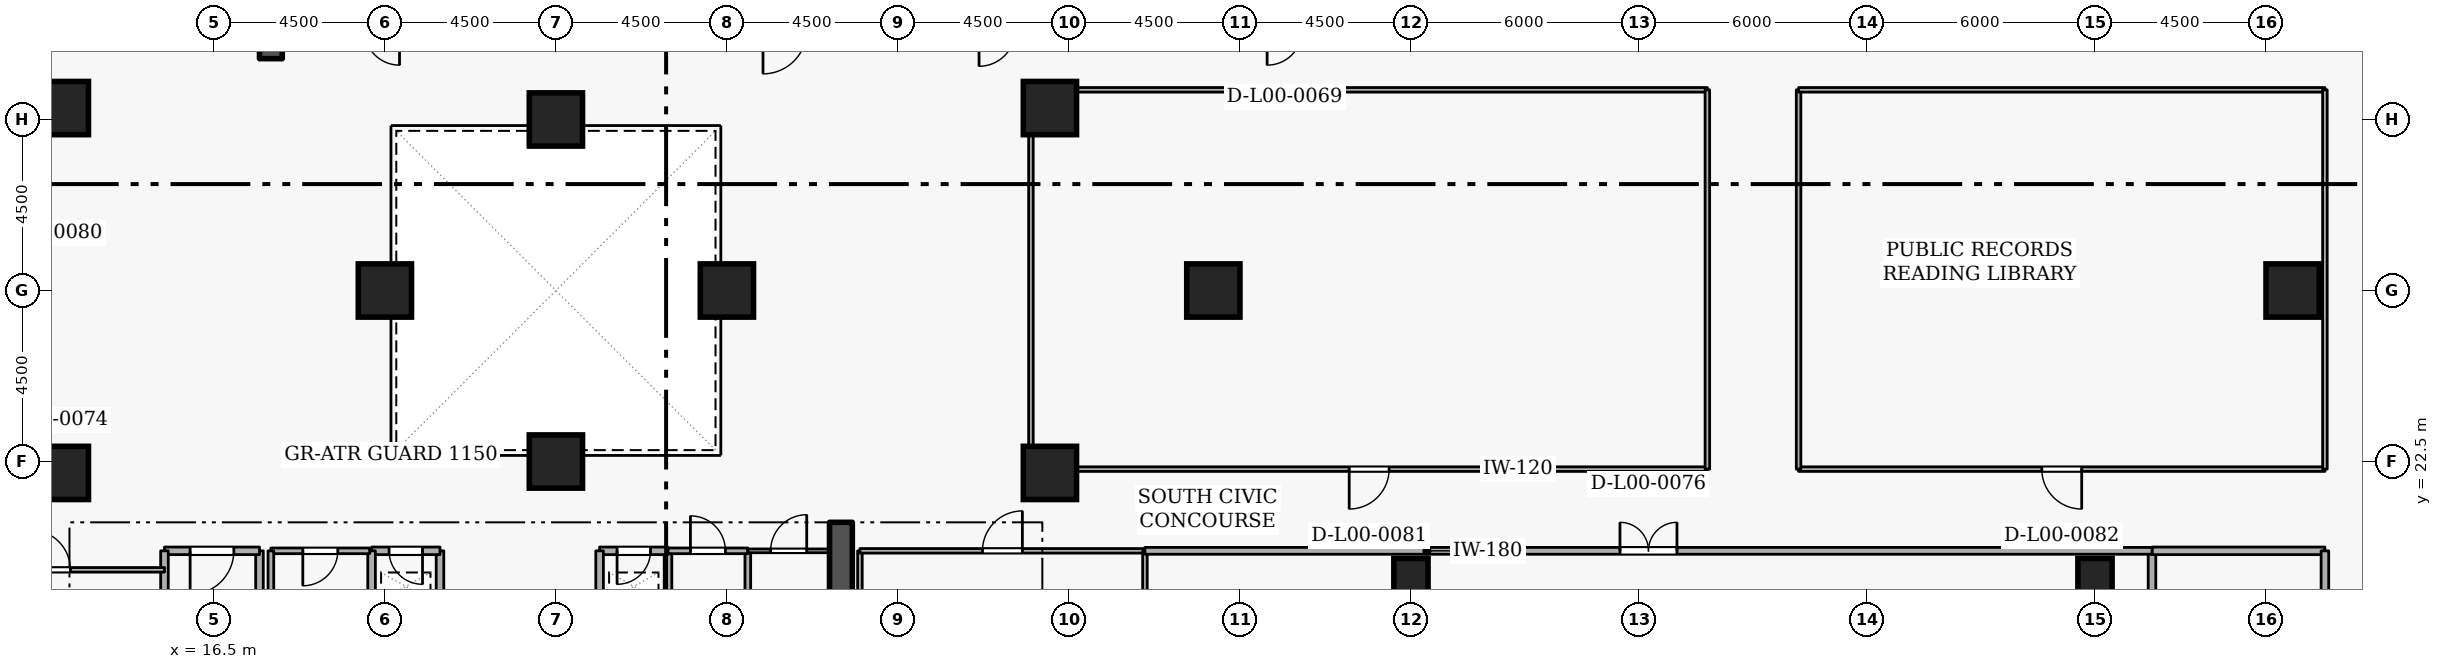
"""IFC4 building model, lengths in metres.
Left out: names, types, materials, properties, quantities, classifications, styles, units other than length and angle.
Written with IfcOpenShell. Run it as: python <this file> out.ifc"""

import sys

from ifc_helpers import new_model, si_unit, direction, frame, frame_2d, origin, origin_2d, place, context, subcontext, project, spatial, rectangle, extrude, element, fill, save


model = new_model("IFC4")
c1 = context("Model", 3, precision=1e-05, world=origin(), true_north=direction((0.0, 1.0)))
c2 = subcontext(c1, "Body", "Model", "MODEL_VIEW")
j1 = project(units=[si_unit("LENGTHUNIT", "METRE"), si_unit("PLANEANGLEUNIT", "RADIAN")], contexts=[c1])
p1 = place(None, origin())
s1 = spatial("IfcSite", under=j1, at=p1, CompositionType="ELEMENT")
p2 = place(p1, origin())
s2 = spatial("IfcBuilding", under=s1, at=p2, CompositionType="ELEMENT")
p3 = place(p2, origin())
s3 = spatial("IfcBuildingStorey", under=s2, at=p3, CompositionType="ELEMENT", Elevation=0.0)
for number, where, z_axis, x_axis in (
    (1, (33.0, 15.2, 0.0), (0.0, 0.0, 1.0), (0.0, 1.0, 0.0)),
    (2, (18.0, 33.1, 0.0), (0.0, 0.0, 1.0), (0.0, 1.0, 0.0)),
):
    element("IfcWall", number, at=place(p3, frame(where, z_axis=z_axis, x_axis=x_axis)), inside=s3, PredefinedType="SHEAR", context=c2, shape_type="SweptSolid", body=[
        extrude(rectangle(XDim=5.7, YDim=0.6, at=frame_2d((2.85, 0.0))), origin(), (0.0, 0.0, 1.0), 4.8),
    ])
for number, where, z_axis, x_axis in (
    (3, (42.8, 27.0, 0.0), (0.0, 0.0, 1.0), (1.0, 0.0, 0.0)),
    (4, (12.5, 22.2, 0.0), (0.0, 0.0, 1.0), (1.0, 0.0, 0.0)),
    (5, (38.5, 22.2, 0.0), (0.0, 0.0, 1.0), (1.0, 0.0, 0.0)),
    (6, (12.5, 31.8, 0.0), (0.0, 0.0, 1.0), (1.0, 0.0, 0.0)),
    (7, (38.5, 31.8, 0.0), (0.0, 0.0, 1.0), (1.0, 0.0, 0.0)),
    (8, (25.5, 22.5, 0.0), (0.0, 0.0, 1.0), (1.0, 0.0, 0.0)),
    (9, (25.5, 31.5, 0.0), (0.0, 0.0, 1.0), (1.0, 0.0, 0.0)),
    (10, (21.0, 27.0, 0.0), (0.0, 0.0, 1.0), (1.0, 0.0, 0.0)),
    (11, (30.0, 27.0, 0.0), (0.0, 0.0, 1.0), (1.0, 0.0, 0.0)),
    (12, (71.2, 27.0, 0.0), (0.0, 0.0, 1.0), (1.0, 0.0, 0.0)),
):
    element("IfcColumn", number, at=place(p3, frame(where, z_axis=z_axis, x_axis=x_axis)), inside=s3, PredefinedType="COLUMN", context=c2, shape_type="SweptSolid", body=[
        extrude(rectangle(XDim=1.4, YDim=1.4, at=origin_2d()), origin(), (0.0, 0.0, 1.0), 4.8),
    ])
for number, where, z_axis, x_axis in (
    (13, (48.0, 19.5, 0.0), (0.0, 0.0, 1.0), (1.0, 0.0, 0.0)),
    (14, (66.0, 19.5, 0.0), (0.0, 0.0, 1.0), (1.0, 0.0, 0.0)),
):
    element("IfcColumn", number, at=place(p3, frame(where, z_axis=z_axis, x_axis=x_axis)), inside=s3, PredefinedType="COLUMN", context=c2, shape_type="SweptSolid", body=[
        extrude(rectangle(XDim=0.9, YDim=0.9, at=origin_2d()), origin(), (0.0, 0.0, 1.0), 4.8),
    ])
p4 = place(p3, frame((17.7, 18.4, 0.0), z_axis=(0.0, 0.0, 1.0), x_axis=(0.0, 1.0, 0.0)))
e15 = element("IfcWall", 15, at=p4, inside=s3, PredefinedType="STANDARD", context=c2, shape_type="SweptSolid", body=[
    extrude(rectangle(XDim=1.75, YDim=0.2, at=frame_2d((0.875, 0.0))), origin(), (0.0, 0.0, 1.0), 3.665),
])
p5 = place(p3, frame((17.7, 20.15, 0.0), z_axis=(0.0, 0.0, 1.0), x_axis=(-1.0, 0.0, 0.0)))
e16 = element("IfcWall", 16, at=p5, inside=s3, PredefinedType="STANDARD", context=c2, shape_type="SweptSolid", body=[
    extrude(rectangle(XDim=2.5, YDim=0.2, at=frame_2d((1.25, 0.0))), origin(), (0.0, 0.0, 1.0), 4.46),
])
p6 = place(p5, frame((0.675, 0.0, 0.0)))
e17 = element("IfcOpeningElement", 17, at=p6, cuts=e16, PredefinedType="OPENING", context=c2, shape_type="SweptSolid", body=[
    extrude(rectangle(XDim=1.15, YDim=2.1, at=frame_2d((0.575, 1.05))), frame((0.0, 0.11, 0.0), z_axis=(0.0, -1.0, 0.0), x_axis=(1.0, 0.0, 0.0)), (0.0, 0.0, 1.0), 0.22),
])
p7 = place(p3, frame((15.2, 20.15, 0.0), z_axis=(0.0, 0.0, 1.0), x_axis=(0.0, -1.0, 0.0)))
e18 = element("IfcWall", 18, at=p7, inside=s3, PredefinedType="STANDARD", context=c2, shape_type="SweptSolid", body=[
    extrude(rectangle(XDim=5.15, YDim=0.2, at=frame_2d((2.575, 0.0))), origin(), (0.0, 0.0, 1.0), 4.46),
])
p8 = place(p3, frame((28.45, 18.65, 0.0), z_axis=(0.0, 0.0, 1.0), x_axis=(0.0, 1.0, 0.0)))
e19 = element("IfcWall", 19, at=p8, inside=s3, PredefinedType="STANDARD", context=c2, shape_type="SweptSolid", body=[
    extrude(rectangle(XDim=1.5, YDim=0.2, at=frame_2d((0.75, 0.0))), origin(), (0.0, 0.0, 1.0), 4.46),
])
p9 = place(p3, frame((28.45, 20.15, 0.0), z_axis=(0.0, 0.0, 1.0), x_axis=(-1.0, 0.0, 0.0)))
e20 = element("IfcWall", 20, at=p9, inside=s3, PredefinedType="STANDARD", context=c2, shape_type="SweptSolid", body=[
    extrude(rectangle(XDim=1.8, YDim=0.2, at=frame_2d((0.9, 0.0))), origin(), (0.0, 0.0, 1.0), 4.46),
])
p10 = place(p9, frame((0.46, 0.0, 0.0)))
e21 = element("IfcOpeningElement", 21, at=p10, cuts=e20, PredefinedType="OPENING", context=c2, shape_type="SweptSolid", body=[
    extrude(rectangle(XDim=0.88, YDim=2.04, at=frame_2d((0.44, 1.02))), frame((0.0, 0.11, 0.0), z_axis=(0.0, -1.0, 0.0), x_axis=(1.0, 0.0, 0.0)), (0.0, 0.0, 1.0), 0.22),
])
for number, where, z_axis, x_axis in (
    (22, (26.65, 20.15, 0.0), (0.0, 0.0, 1.0), (0.0, -1.0, 0.0)),
    (23, (22.45, 18.65, 0.0), (0.0, 0.0, 1.0), (0.0, 1.0, 0.0)),
):
    element("IfcWall", number, at=place(p3, frame(where, z_axis=z_axis, x_axis=x_axis)), inside=s3, PredefinedType="STANDARD", context=c2, shape_type="SweptSolid", body=[
        extrude(rectangle(XDim=1.5, YDim=0.2, at=frame_2d((0.75, 0.0))), origin(), (0.0, 0.0, 1.0), 4.46),
    ])
p11 = place(p3, frame((22.45, 20.15, 0.0), z_axis=(0.0, 0.0, 1.0), x_axis=(-1.0, 0.0, 0.0)))
e24 = element("IfcWall", 24, at=p11, inside=s3, PredefinedType="STANDARD", context=c2, shape_type="SweptSolid", body=[
    extrude(rectangle(XDim=1.8, YDim=0.2, at=frame_2d((0.9, 0.0))), origin(), (0.0, 0.0, 1.0), 4.46),
])
p12 = place(p11, frame((0.46, 0.0, 0.0)))
e25 = element("IfcOpeningElement", 25, at=p12, cuts=e24, PredefinedType="OPENING", context=c2, shape_type="SweptSolid", body=[
    extrude(rectangle(XDim=0.88, YDim=2.04, at=frame_2d((0.44, 1.02))), frame((0.0, 0.11, 0.0), z_axis=(0.0, -1.0, 0.0), x_axis=(1.0, 0.0, 0.0)), (0.0, 0.0, 1.0), 0.22),
])
p13 = place(p3, frame((20.65, 20.15, 0.0), z_axis=(0.0, 0.0, 1.0), x_axis=(0.0, -1.0, 0.0)))
e26 = element("IfcWall", 26, at=p13, inside=s3, PredefinedType="STANDARD", context=c2, shape_type="SweptSolid", body=[
    extrude(rectangle(XDim=1.5, YDim=0.2, at=frame_2d((0.75, 0.0))), origin(), (0.0, 0.0, 1.0), 4.46),
])
p14 = place(p3, frame((67.5, 4.82, 0.0), z_axis=(0.0, 0.0, 1.0), x_axis=(0.0, 1.0, 0.0)))
e27 = element("IfcWall", 27, at=p14, inside=s3, PredefinedType="STANDARD", context=c2, shape_type="SweptSolid", body=[
    extrude(rectangle(XDim=15.33, YDim=0.2, at=frame_2d((7.665, 0.0))), origin(), (0.0, 0.0, 1.0), 3.538),
])
p15 = place(p3, frame((67.5, 20.15, 0.0), z_axis=(0.0, 0.0, 1.0), x_axis=(1.0, 0.0, 0.0)))
e28 = element("IfcWall", 28, at=p15, inside=s3, PredefinedType="STANDARD", context=c2, shape_type="SweptSolid", body=[
    extrude(rectangle(XDim=4.55, YDim=0.2, at=frame_2d((2.275, 0.0))), origin(), (0.0, 0.0, 1.0), 4.46),
])
p16 = place(p3, frame((72.05, 20.15, 0.0), z_axis=(0.0, 0.0, 1.0), x_axis=(0.0, -1.0, 0.0)))
e29 = element("IfcWall", 29, at=p16, inside=s3, PredefinedType="STANDARD", context=c2, shape_type="SweptSolid", body=[
    extrude(rectangle(XDim=5.35, YDim=0.2, at=frame_2d((2.675, 0.0))), origin(), (0.0, 0.0, 1.0), 4.46),
])
p17 = place(p16, frame((2.1, 0.0, 0.0)))
e30 = element("IfcOpeningElement", 30, at=p17, cuts=e29, PredefinedType="OPENING", context=c2, shape_type="SweptSolid", body=[
    extrude(rectangle(XDim=1.15, YDim=2.1, at=frame_2d((0.575, 1.05))), frame((0.0, 0.11, 0.0), z_axis=(0.0, -1.0, 0.0), x_axis=(1.0, 0.0, 0.0)), (0.0, 0.0, 1.0), 0.22),
])
p18 = place(p3, frame((20.6, 20.15, 0.0), z_axis=(0.0, 0.0, 1.0), x_axis=(-1.0, 0.0, 0.0)))
e31 = element("IfcWall", 31, at=p18, inside=s3, PredefinedType="PARTITIONING", context=c2, shape_type="SweptSolid", body=[
    extrude(rectangle(XDim=2.6, YDim=0.15, at=frame_2d((1.3, 0.0))), origin(), (0.0, 0.0, 1.0), 4.46),
])
p19 = place(p18, frame((0.84, 0.0, 0.0)))
e32 = element("IfcOpeningElement", 32, at=p19, cuts=e31, PredefinedType="OPENING", context=c2, shape_type="SweptSolid", body=[
    extrude(rectangle(XDim=0.92, YDim=2.08, at=frame_2d((0.46, 1.04))), frame((0.0, 0.085, 0.0), z_axis=(0.0, -1.0, 0.0), x_axis=(1.0, 0.0, 0.0)), (0.0, 0.0, 1.0), 0.17),
])
p20 = place(p3, frame((18.0, 20.15, 0.0), z_axis=(0.0, 0.0, 1.0), x_axis=(0.0, -1.0, 0.0)))
e33 = element("IfcWall", 33, at=p20, inside=s3, PredefinedType="PARTITIONING", context=c2, shape_type="SweptSolid", body=[
    extrude(rectangle(XDim=1.5, YDim=0.15, at=frame_2d((0.75, 0.0))), origin(), (0.0, 0.0, 1.0), 3.665),
])
p21 = place(p3, frame((30.55, 20.15, 0.0), z_axis=(0.0, 0.0, 1.0), x_axis=(0.0, -1.0, 0.0)))
e34 = element("IfcWall", 34, at=p21, inside=s3, PredefinedType="PARTITIONING", context=c2, shape_type="SweptSolid", body=[
    extrude(rectangle(XDim=1.5, YDim=0.15, at=frame_2d((0.75, 0.0))), origin(), (0.0, 0.0, 1.0), 4.46),
])
p22 = place(p3, frame((28.45, 20.15, 0.0), z_axis=(0.0, 0.0, 1.0), x_axis=(1.0, 0.0, 0.0)))
e35 = element("IfcWall", 35, at=p22, inside=s3, PredefinedType="PARTITIONING", context=c2, shape_type="SweptSolid", body=[
    extrude(rectangle(XDim=2.1, YDim=0.15, at=frame_2d((1.05, 0.0))), origin(), (0.0, 0.0, 1.0), 4.46),
])
p23 = place(p22, frame((0.59, 0.0, 0.0)))
e36 = element("IfcOpeningElement", 36, at=p23, cuts=e35, PredefinedType="OPENING", context=c2, shape_type="SweptSolid", body=[
    extrude(rectangle(XDim=0.92, YDim=2.08, at=frame_2d((0.46, 1.04))), frame((0.0, 0.085, 0.0), z_axis=(0.0, -1.0, 0.0), x_axis=(1.0, 0.0, 0.0)), (0.0, 0.0, 1.0), 0.17),
])
p24 = place(p3, frame((30.55, 20.15, 0.0), z_axis=(0.0, 0.0, 1.0), x_axis=(1.0, 0.0, 0.0)))
e37 = element("IfcWall", 37, at=p24, inside=s3, PredefinedType="PARTITIONING", context=c2, shape_type="SweptSolid", body=[
    extrude(rectangle(XDim=2.15, YDim=0.1, at=frame_2d((1.075, 0.0))), origin(), (0.0, 0.0, 1.0), 4.46),
])
p25 = place(p24, frame((0.6, 0.0, 0.0)))
e38 = element("IfcOpeningElement", 38, at=p25, cuts=e37, PredefinedType="OPENING", context=c2, shape_type="SweptSolid", body=[
    extrude(rectangle(XDim=0.95, YDim=2.1, at=frame_2d((0.475, 1.05))), frame((0.0, 0.06, 0.0), z_axis=(0.0, -1.0, 0.0), x_axis=(1.0, 0.0, 0.0)), (0.0, 0.0, 1.0), 0.12),
])
p26 = place(p3, frame((9.2, 19.65, 0.0), z_axis=(0.0, 0.0, 1.0), x_axis=(1.0, 0.0, 0.0)))
e39 = element("IfcWall", 39, at=p26, inside=s3, PredefinedType="PARTITIONING", context=c2, shape_type="SweptSolid", body=[
    extrude(rectangle(XDim=6.0, YDim=0.12, at=frame_2d((3.0, 0.0))), origin(), (0.0, 0.0, 1.0), 4.46),
])
p27 = place(p26, frame((2.475, 0.0, 0.0)))
e40 = element("IfcOpeningElement", 40, at=p27, cuts=e39, PredefinedType="OPENING", context=c2, shape_type="SweptSolid", body=[
    extrude(rectangle(XDim=1.05, YDim=2.1, at=frame_2d((0.525, 1.05))), frame((0.0, 0.07, 0.0), z_axis=(0.0, -1.0, 0.0), x_axis=(1.0, 0.0, 0.0)), (0.0, 0.0, 1.0), 0.14),
])
p28 = place(p3, frame((33.5, 4.82, 0.0), z_axis=(0.0, 0.0, 1.0), x_axis=(0.0, 1.0, 0.0)))
e41 = element("IfcWall", 41, at=p28, inside=s3, PredefinedType="PARTITIONING", context=c2, shape_type="SweptSolid", body=[
    extrude(rectangle(XDim=15.33, YDim=0.12, at=frame_2d((7.665, 0.0))), origin(), (0.0, 0.0, 1.0), 4.46),
])
p29 = place(p3, frame((33.5, 20.15, 0.0), z_axis=(0.0, 0.0, 1.0), x_axis=(1.0, 0.0, 0.0)))
e42 = element("IfcWall", 42, at=p29, inside=s3, PredefinedType="PARTITIONING", context=c2, shape_type="SweptSolid", body=[
    extrude(rectangle(XDim=7.5, YDim=0.12, at=frame_2d((3.75, 0.0))), origin(), (0.0, 0.0, 1.0), 4.46),
])
p30 = place(p29, frame((3.225, 0.0, 0.0)))
e43 = element("IfcOpeningElement", 43, at=p30, cuts=e42, PredefinedType="OPENING", context=c2, shape_type="SweptSolid", body=[
    extrude(rectangle(XDim=1.05, YDim=2.1, at=frame_2d((0.525, 1.05))), frame((0.0, 0.07, 0.0), z_axis=(0.0, -1.0, 0.0), x_axis=(1.0, 0.0, 0.0)), (0.0, 0.0, 1.0), 0.14),
])
p31 = place(p3, frame((41.0, 20.15, 0.0), z_axis=(0.0, 0.0, 1.0), x_axis=(0.0, -1.0, 0.0)))
e44 = element("IfcWall", 44, at=p31, inside=s3, PredefinedType="PARTITIONING", context=c2, shape_type="SweptSolid", body=[
    extrude(rectangle(XDim=15.33, YDim=0.12, at=frame_2d((7.665, 0.0))), origin(), (0.0, 0.0, 1.0), 4.46),
])
p32 = place(p3, frame((41.0, 20.15, 0.0), z_axis=(0.0, 0.0, 1.0), x_axis=(1.0, 0.0, 0.0)))
e45 = element("IfcWall", 45, at=p32, inside=s3, PredefinedType="PARTITIONING", context=c2, shape_type="SweptSolid", body=[
    extrude(rectangle(XDim=26.5, YDim=0.18, at=frame_2d((13.25, 0.0))), origin(), (0.0, 0.0, 1.0), 4.46),
])
p33 = place(p32, frame((12.5, 0.0, 0.0)))
e46 = element("IfcOpeningElement", 46, at=p33, cuts=e45, PredefinedType="OPENING", context=c2, shape_type="SweptSolid", body=[
    extrude(rectangle(XDim=1.5, YDim=2.15, at=frame_2d((0.75, 1.075))), frame((0.0, 0.1, 0.0), z_axis=(0.0, -1.0, 0.0), x_axis=(1.0, 0.0, 0.0)), (0.0, 0.0, 1.0), 0.2),
])
p34 = place(p3, frame((55.8, 22.3, 0.0), z_axis=(0.0, 0.0, 1.0), x_axis=(-1.0, 0.0, 0.0)))
e47 = element("IfcWall", 47, at=p34, inside=s3, PredefinedType="PARTITIONING", context=c2, shape_type="SweptSolid", body=[
    extrude(rectangle(XDim=17.8, YDim=0.12, at=frame_2d((8.9, 0.0))), origin(), (0.0, 0.0, 1.0), 4.46),
])
p35 = place(p34, frame((8.375, 0.0, 0.0)))
e48 = element("IfcOpeningElement", 48, at=p35, cuts=e47, PredefinedType="OPENING", context=c2, shape_type="SweptSolid", body=[
    extrude(rectangle(XDim=1.05, YDim=2.1, at=frame_2d((0.525, 1.05))), frame((0.0, 0.07, 0.0), z_axis=(0.0, -1.0, 0.0), x_axis=(1.0, 0.0, 0.0)), (0.0, 0.0, 1.0), 0.14),
])
p36 = place(p3, frame((38.0, 22.3, 0.0), z_axis=(0.0, 0.0, 1.0), x_axis=(0.0, 1.0, 0.0)))
e49 = element("IfcWall", 49, at=p36, inside=s3, PredefinedType="PARTITIONING", context=c2, shape_type="SweptSolid", body=[
    extrude(rectangle(XDim=9.98, YDim=0.12, at=frame_2d((4.99, 0.0))), origin(), (0.0, 0.0, 1.0), 4.46),
])
p37 = place(p3, frame((38.0, 32.28, 0.0), z_axis=(0.0, 0.0, 1.0), x_axis=(1.0, 0.0, 0.0)))
e50 = element("IfcWall", 50, at=p37, inside=s3, PredefinedType="PARTITIONING", context=c2, shape_type="SweptSolid", body=[
    extrude(rectangle(XDim=17.8, YDim=0.12, at=frame_2d((8.9, 0.0))), origin(), (0.0, 0.0, 1.0), 4.46),
])
p38 = place(p3, frame((55.8, 32.28, 0.0), z_axis=(0.0, 0.0, 1.0), x_axis=(0.0, -1.0, 0.0)))
e51 = element("IfcWall", 51, at=p38, inside=s3, PredefinedType="PARTITIONING", context=c2, shape_type="SweptSolid", body=[
    extrude(rectangle(XDim=9.98, YDim=0.12, at=frame_2d((4.99, 0.0))), origin(), (0.0, 0.0, 1.0), 4.46),
])
p39 = place(p3, frame((72.05, 22.3, 0.0), z_axis=(0.0, 0.0, 1.0), x_axis=(-1.0, 0.0, 0.0)))
e52 = element("IfcWall", 52, at=p39, inside=s3, PredefinedType="PARTITIONING", context=c2, shape_type="SweptSolid", body=[
    extrude(rectangle(XDim=13.85, YDim=0.12, at=frame_2d((6.925, 0.0))), origin(), (0.0, 0.0, 1.0), 4.46),
])
p40 = place(p39, frame((6.4, 0.0, 0.0)))
e53 = element("IfcOpeningElement", 53, at=p40, cuts=e52, PredefinedType="OPENING", context=c2, shape_type="SweptSolid", body=[
    extrude(rectangle(XDim=1.05, YDim=2.1, at=frame_2d((0.525, 1.05))), frame((0.0, 0.07, 0.0), z_axis=(0.0, -1.0, 0.0), x_axis=(1.0, 0.0, 0.0)), (0.0, 0.0, 1.0), 0.14),
])
p41 = place(p3, frame((58.2, 22.3, 0.0), z_axis=(0.0, 0.0, 1.0), x_axis=(0.0, 1.0, 0.0)))
e54 = element("IfcWall", 54, at=p41, inside=s3, PredefinedType="PARTITIONING", context=c2, shape_type="SweptSolid", body=[
    extrude(rectangle(XDim=9.98, YDim=0.12, at=frame_2d((4.99, 0.0))), origin(), (0.0, 0.0, 1.0), 4.46),
])
p42 = place(p3, frame((58.2, 32.28, 0.0), z_axis=(0.0, 0.0, 1.0), x_axis=(1.0, 0.0, 0.0)))
e55 = element("IfcWall", 55, at=p42, inside=s3, PredefinedType="PARTITIONING", context=c2, shape_type="SweptSolid", body=[
    extrude(rectangle(XDim=13.85, YDim=0.12, at=frame_2d((6.925, 0.0))), origin(), (0.0, 0.0, 1.0), 4.46),
])
p43 = place(p3, frame((72.05, 32.28, 0.0), z_axis=(0.0, 0.0, 1.0), x_axis=(0.0, -1.0, 0.0)))
e56 = element("IfcWall", 56, at=p43, inside=s3, PredefinedType="PARTITIONING", context=c2, shape_type="SweptSolid", body=[
    extrude(rectangle(XDim=9.98, YDim=0.12, at=frame_2d((4.99, 0.0))), origin(), (0.0, 0.0, 1.0), 4.46),
])
p44 = place(p6, origin())
e57 = element("IfcDoor", 57, at=p44, inside=s3, OperationType="SINGLE_SWING_RIGHT", PredefinedType="DOOR", context=c2, shape_type="SweptSolid", body=[
    extrude(rectangle(XDim=1.15, YDim=2.1, at=frame_2d((0.575, 1.05))), frame((0.0, 0.025, 0.0), z_axis=(0.0, -1.0, 0.0), x_axis=(1.0, 0.0, 0.0)), (0.0, 0.0, 1.0), 0.05),
])
fill(e17, e57)
p45 = place(p10, origin())
e58 = element("IfcDoor", 58, at=p45, inside=s3, OperationType="SINGLE_SWING_RIGHT", PredefinedType="DOOR", context=c2, shape_type="SweptSolid", body=[
    extrude(rectangle(XDim=0.88, YDim=2.04, at=frame_2d((0.44, 1.02))), frame((0.0, 0.025, 0.0), z_axis=(0.0, -1.0, 0.0), x_axis=(1.0, 0.0, 0.0)), (0.0, 0.0, 1.0), 0.05),
])
fill(e21, e58)
p46 = place(p12, origin())
e59 = element("IfcDoor", 59, at=p46, inside=s3, OperationType="SINGLE_SWING_LEFT", PredefinedType="DOOR", context=c2, shape_type="SweptSolid", body=[
    extrude(rectangle(XDim=0.88, YDim=2.04, at=frame_2d((0.44, 1.02))), frame((0.0, 0.025, 0.0), z_axis=(0.0, -1.0, 0.0), x_axis=(1.0, 0.0, 0.0)), (0.0, 0.0, 1.0), 0.05),
])
fill(e25, e59)
p47 = place(p19, origin())
e60 = element("IfcDoor", 60, at=p47, inside=s3, OperationType="SINGLE_SWING_RIGHT", PredefinedType="DOOR", context=c2, shape_type="SweptSolid", body=[
    extrude(rectangle(XDim=0.92, YDim=2.08, at=frame_2d((0.46, 1.04))), frame((0.0, 0.025, 0.0), z_axis=(0.0, -1.0, 0.0), x_axis=(1.0, 0.0, 0.0)), (0.0, 0.0, 1.0), 0.05),
])
fill(e32, e60)
p48 = place(p23, origin())
e61 = element("IfcDoor", 61, at=p48, inside=s3, OperationType="SINGLE_SWING_LEFT", PredefinedType="DOOR", context=c2, shape_type="SweptSolid", body=[
    extrude(rectangle(XDim=0.92, YDim=2.08, at=frame_2d((0.46, 1.04))), frame((0.0, 0.025, 0.0), z_axis=(0.0, -1.0, 0.0), x_axis=(1.0, 0.0, 0.0)), (0.0, 0.0, 1.0), 0.05),
])
fill(e36, e61)
p49 = place(p25, origin())
e62 = element("IfcDoor", 62, at=p49, inside=s3, OperationType="SINGLE_SWING_RIGHT", PredefinedType="DOOR", context=c2, shape_type="SweptSolid", body=[
    extrude(rectangle(XDim=0.95, YDim=2.1, at=frame_2d((0.475, 1.05))), frame((0.0, 0.025, 0.0), z_axis=(0.0, -1.0, 0.0), x_axis=(1.0, 0.0, 0.0)), (0.0, 0.0, 1.0), 0.05),
])
fill(e38, e62)
p50 = place(p27, origin())
e63 = element("IfcDoor", 63, at=p50, inside=s3, OperationType="SINGLE_SWING_LEFT", PredefinedType="DOOR", context=c2, shape_type="SweptSolid", body=[
    extrude(rectangle(XDim=1.05, YDim=2.1, at=frame_2d((0.525, 1.05))), frame((0.0, 0.025, 0.0), z_axis=(0.0, -1.0, 0.0), x_axis=(1.0, 0.0, 0.0)), (0.0, 0.0, 1.0), 0.05),
])
fill(e40, e63)
p51 = place(p30, origin())
e64 = element("IfcDoor", 64, at=p51, inside=s3, OperationType="SINGLE_SWING_RIGHT", PredefinedType="DOOR", context=c2, shape_type="SweptSolid", body=[
    extrude(rectangle(XDim=1.05, YDim=2.1, at=frame_2d((0.525, 1.05))), frame((0.0, 0.025, 0.0), z_axis=(0.0, -1.0, 0.0), x_axis=(1.0, 0.0, 0.0)), (0.0, 0.0, 1.0), 0.05),
])
fill(e43, e64)
p52 = place(p33, origin())
e65 = element("IfcDoor", 65, at=p52, inside=s3, OperationType="DOUBLE_DOOR_SINGLE_SWING", PredefinedType="DOOR", context=c2, shape_type="SweptSolid", body=[
    extrude(rectangle(XDim=1.5, YDim=2.15, at=frame_2d((0.75, 1.075))), frame((0.0, 0.025, 0.0), z_axis=(0.0, -1.0, 0.0), x_axis=(1.0, 0.0, 0.0)), (0.0, 0.0, 1.0), 0.05),
])
fill(e46, e65)
p53 = place(p35, origin())
e66 = element("IfcDoor", 66, at=p53, inside=s3, OperationType="SINGLE_SWING_RIGHT", PredefinedType="DOOR", context=c2, shape_type="SweptSolid", body=[
    extrude(rectangle(XDim=1.05, YDim=2.1, at=frame_2d((0.525, 1.05))), frame((0.0, 0.025, 0.0), z_axis=(0.0, -1.0, 0.0), x_axis=(1.0, 0.0, 0.0)), (0.0, 0.0, 1.0), 0.05),
])
fill(e48, e66)
p54 = place(p40, origin())
e67 = element("IfcDoor", 67, at=p54, inside=s3, OperationType="SINGLE_SWING_LEFT", PredefinedType="DOOR", context=c2, shape_type="SweptSolid", body=[
    extrude(rectangle(XDim=1.05, YDim=2.1, at=frame_2d((0.525, 1.05))), frame((0.0, 0.025, 0.0), z_axis=(0.0, -1.0, 0.0), x_axis=(1.0, 0.0, 0.0)), (0.0, 0.0, 1.0), 0.05),
])
fill(e53, e67)
save(model, sys.argv[1])
